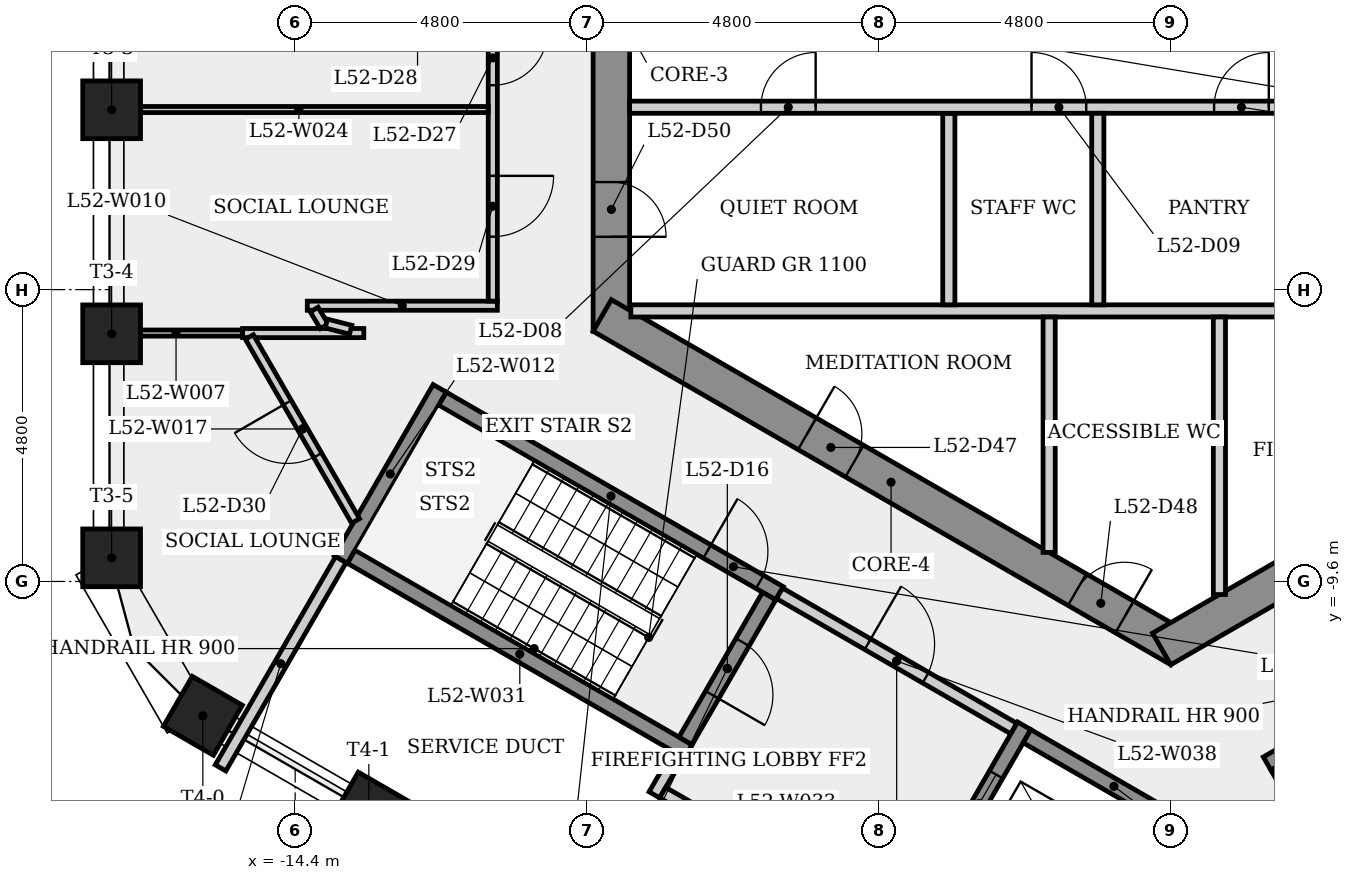
"""IFC4 building model, lengths in metres.
Left out: names, types, materials, properties, quantities, classifications, styles, units other than length and angle.
Written with IfcOpenShell. Run it as: python <this file> out.ifc"""

import sys

from ifc_helpers import new_model, si_unit, direction, frame, frame_2d, origin, origin_2d, place, context, subcontext, project, spatial, rectangle, extrude, element, fill, save


model = new_model("IFC4")
c1 = context("Model", 3, precision=1e-05, world=origin(), true_north=direction((0.0, 1.0)))
c2 = subcontext(c1, "Body", "Model", "MODEL_VIEW")
j1 = project(units=[si_unit("LENGTHUNIT", "METRE"), si_unit("PLANEANGLEUNIT", "RADIAN")], contexts=[c1])
p1 = place(None, origin())
s1 = spatial("IfcSite", under=j1, at=p1, CompositionType="ELEMENT")
p2 = place(p1, origin())
s2 = spatial("IfcBuilding", under=s1, at=p2, CompositionType="ELEMENT")
p3 = place(p2, frame((0.0, 0.0, 194.7)))
s3 = spatial("IfcBuildingStorey", under=s2, at=p3, CompositionType="ELEMENT", Elevation=194.7)
p4 = place(p3, frame((-9.2, 5.485, 0.0), z_axis=(0.0, 0.0, 1.0), x_axis=(0.0, -1.0, 0.0)))
e1 = element("IfcWall", 1, at=p4, inside=s3, PredefinedType="SHEAR", context=c2, shape_type="SweptSolid", body=[
    extrude(rectangle(XDim=10.97, YDim=0.6, at=frame_2d((5.485, 0.0))), origin(), (0.0, 0.0, 1.0), 4.0),
])
p5 = place(p4, frame((8.516, 0.0, 0.0)))
e2 = element("IfcOpeningElement", 2, at=p5, cuts=e1, PredefinedType="OPENING", context=c2, shape_type="SweptSolid", body=[
    extrude(rectangle(XDim=0.9, YDim=2.1, at=frame_2d((0.45, 1.05))), frame((0.0, 0.31, 0.0), z_axis=(0.0, -1.0, 0.0), x_axis=(1.0, 0.0, 0.0)), (0.0, 0.0, 1.0), 0.62),
])
p6 = place(p4, frame((4.685, 0.0, 0.0)))
e3 = element("IfcOpeningElement", 3, at=p6, cuts=e1, PredefinedType="OPENING", context=c2, shape_type="SweptSolid", body=[
    extrude(rectangle(XDim=1.6, YDim=2.1, at=frame_2d((0.8, 1.05))), frame((0.0, 0.31, 0.0), z_axis=(0.0, -1.0, 0.0), x_axis=(1.0, 0.0, 0.0)), (0.0, 0.0, 1.0), 0.62),
])
p7 = place(p3, frame((-9.35, -5.225, 0.0), z_axis=(0.0, 0.0, 1.0), x_axis=(0.866023993627, -0.500002442456, 0.0)))
e4 = element("IfcWall", 4, at=p7, inside=s3, PredefinedType="SHEAR", context=c2, shape_type="SweptSolid", body=[
    extrude(rectangle(XDim=10.97, YDim=0.6, at=frame_2d((5.485, 0.0))), origin(), (0.0, 0.0, 1.0), 4.0),
])
p8 = place(p7, frame((3.891, 0.0, 0.0)))
e5 = element("IfcOpeningElement", 5, at=p8, cuts=e4, PredefinedType="OPENING", context=c2, shape_type="SweptSolid", body=[
    extrude(rectangle(XDim=0.9, YDim=2.1, at=frame_2d((0.45, 1.05))), frame((0.0, 0.31, 0.0), z_axis=(0.0, -1.0, 0.0), x_axis=(1.0, 0.0, 0.0)), (0.0, 0.0, 1.0), 0.62),
])
p9 = place(p7, frame((9.018, 0.0, 0.0)))
e6 = element("IfcOpeningElement", 6, at=p9, cuts=e4, PredefinedType="OPENING", context=c2, shape_type="SweptSolid", body=[
    extrude(rectangle(XDim=0.9, YDim=2.1, at=frame_2d((0.45, 1.05))), frame((0.0, 0.31, 0.0), z_axis=(0.0, -1.0, 0.0), x_axis=(1.0, 0.0, 0.0)), (0.0, 0.0, 1.0), 0.62),
])
p10 = place(p3, frame((-0.15, -10.71, 0.0), z_axis=(0.0, 0.0, 1.0), x_axis=(0.866023993627, 0.500002442456, 0.0)))
e7 = element("IfcWall", 7, at=p10, inside=s3, PredefinedType="SHEAR", context=c2, shape_type="SweptSolid", body=[
    extrude(rectangle(XDim=10.97, YDim=0.6, at=frame_2d((5.485, 0.0))), origin(), (0.0, 0.0, 1.0), 4.0),
])
p11 = place(p10, frame((7.166, 0.0, 0.0)))
e8 = element("IfcOpeningElement", 8, at=p11, cuts=e7, PredefinedType="OPENING", context=c2, shape_type="SweptSolid", body=[
    extrude(rectangle(XDim=0.9, YDim=2.1, at=frame_2d((0.45, 1.05))), frame((0.0, 0.31, 0.0), z_axis=(0.0, -1.0, 0.0), x_axis=(1.0, 0.0, 0.0)), (0.0, 0.0, 1.0), 0.62),
])
for number, where, z_axis, x_axis in (
    (9, (-17.418, -1.842, 0.0), (0.0, 0.0, 1.0), (-1.0, 0.0, 0.0)),
    (10, (-17.418, -5.527, 0.0), (0.0, 0.0, 1.0), (-1.0, 0.0, 0.0)),
    (11, (-17.418, -9.211, 0.0), (0.0, 0.0, 1.0), (-1.0, 0.0, 0.0)),
    (12, (-15.918, -11.809, 0.0), (0.0, 0.0, 1.0), (-0.5, -0.866, 0.0)),
    (13, (-13.188, -13.386, 0.0), (0.0, 0.0, 1.0), (-0.5, -0.866, 0.0)),
):
    element("IfcColumn", number, at=place(p3, frame(where, z_axis=z_axis, x_axis=x_axis)), inside=s3, PredefinedType="COLUMN", context=c2, shape_type="SweptSolid", body=[
        extrude(rectangle(XDim=0.95, YDim=0.95, at=origin_2d()), origin(), (0.0, 0.0, 1.0), 4.0),
    ])
p12 = place(p3, frame((-15.627, -12.666, 0.0), z_axis=(0.0, 0.0, 1.0), x_axis=(0.499980548326, 0.866036633923, 0.0)))
e14 = element("IfcWall", 14, at=p12, inside=s3, PredefinedType="PLUMBINGWALL", context=c2, shape_type="SweptSolid", body=[
    extrude(rectangle(XDim=3.958, YDim=0.2, at=frame_2d((1.979, 0.0))), origin(), (0.0, 0.0, 1.0), 3.65),
])
p13 = place(p3, frame((-15.265, -5.515, 0.0), z_axis=(0.0, 0.0, 1.0), x_axis=(1.0, 0.0, 0.0)))
e15 = element("IfcWall", 15, at=p13, inside=s3, PredefinedType="PARTITIONING", context=c2, shape_type="SweptSolid", body=[
    extrude(rectangle(XDim=1.994, YDim=0.15, at=frame_2d((0.997, 0.0))), origin(), (0.0, 0.0, 1.0), 3.65),
])
p14 = place(p3, frame((-15.265, -5.515, 0.0), z_axis=(0.0, 0.0, 1.0), x_axis=(-1.0, 0.0, 0.0)))
e16 = element("IfcWall", 16, at=p14, inside=s3, PredefinedType="PARTITIONING", context=c2, shape_type="SweptSolid", body=[
    extrude(rectangle(XDim=2.188, YDim=0.1, at=frame_2d((1.094, 0.0))), origin(), (0.0, 0.0, 1.0), 3.65),
])
p15 = place(p3, frame((-14.201, -5.065, 0.0), z_axis=(0.0, 0.0, 1.0), x_axis=(1.0, 0.0, 0.0)))
e17 = element("IfcWall", 17, at=p15, inside=s3, PredefinedType="PARTITIONING", context=c2, shape_type="SweptSolid", body=[
    extrude(rectangle(XDim=3.126, YDim=0.15, at=frame_2d((1.563, 0.0))), origin(), (0.0, 0.0, 1.0), 3.65),
])
p16 = place(p3, frame((-13.922, -5.404, 0.0), z_axis=(0.0, 0.0, 1.0), x_axis=(-0.516174148431, 0.856483653371, 0.0)))
e18 = element("IfcWall", 18, at=p16, inside=s3, PredefinedType="PARTITIONING", context=c2, shape_type="SweptSolid", body=[
    extrude(rectangle(XDim=0.321, YDim=0.15, at=frame_2d((0.16, 0.0))), origin(), (0.0, 0.0, 1.0), 3.65),
])
p17 = place(p3, frame((-13.648, -9.239, 0.0), z_axis=(0.0, 0.0, 1.0), x_axis=(0.500017246033, 0.866015446554, 0.0)))
e19 = element("IfcWall", 19, at=p17, inside=s3, PredefinedType="SHEAR", context=c2, shape_type="SweptSolid", body=[
    extrude(rectangle(XDim=3.25, YDim=0.25, at=frame_2d((1.625, 0.0))), origin(), (0.0, 0.0, 1.0), 3.65),
])
p18 = place(p3, frame((-13.487, -5.46, 0.0), z_axis=(0.0, 0.0, 1.0), x_axis=(-0.968736704431, 0.248091107232, 0.0)))
e20 = element("IfcWall", 20, at=p18, inside=s3, PredefinedType="PARTITIONING", context=c2, shape_type="SweptSolid", body=[
    extrude(rectangle(XDim=0.413, YDim=0.15, at=frame_2d((0.207, 0.0))), origin(), (0.0, 0.0, 1.0), 3.65),
])
p19 = place(p3, frame((-13.406, -8.604, 0.0), z_axis=(0.0, 0.0, 1.0), x_axis=(-0.499980611808, 0.866036597273, 0.0)))
e21 = element("IfcWall", 21, at=p19, inside=s3, PredefinedType="PARTITIONING", context=c2, shape_type="SweptSolid", body=[
    extrude(rectangle(XDim=3.493, YDim=0.15, at=frame_2d((1.747, 0.0))), origin(), (0.0, 0.0, 1.0), 3.65),
])
p20 = place(p19, frame((1.246, 0.0, 0.0)))
e22 = element("IfcOpeningElement", 22, at=p20, cuts=e21, PredefinedType="OPENING", context=c2, shape_type="SweptSolid", body=[
    extrude(rectangle(XDim=1.0, YDim=2.1, at=frame_2d((0.5, 1.05))), frame((0.0, 0.085, 0.0), z_axis=(0.0, -1.0, 0.0), x_axis=(1.0, 0.0, 0.0)), (0.0, 0.0, 1.0), 0.17),
])
p21 = place(p3, frame((-11.977, -6.595, 0.0), z_axis=(0.0, 0.0, 1.0), x_axis=(0.866025499775, -0.499999833739, 0.0)))
e23 = element("IfcWall", 23, at=p21, inside=s3, PredefinedType="SHEAR", context=c2, shape_type="SweptSolid", body=[
    extrude(rectangle(XDim=6.4, YDim=0.25, at=frame_2d((3.2, 0.0))), origin(), (0.0, 0.0, 1.0), 3.65),
])
p22 = place(p21, frame((5.025, 0.0, 0.0)))
e24 = element("IfcOpeningElement", 24, at=p22, cuts=e23, PredefinedType="OPENING", context=c2, shape_type="SweptSolid", body=[
    extrude(rectangle(XDim=1.0, YDim=2.1, at=frame_2d((0.5, 1.05))), frame((0.0, 0.135, 0.0), z_axis=(0.0, -1.0, 0.0), x_axis=(1.0, 0.0, 0.0)), (0.0, 0.0, 1.0), 0.27),
])
p23 = place(p3, frame((-11.15, 5.59, 0.0), z_axis=(0.0, 0.0, 1.0), x_axis=(0.0, -1.0, 0.0)))
e25 = element("IfcWall", 25, at=p23, inside=s3, PredefinedType="PARTITIONING", context=c2, shape_type="SweptSolid", body=[
    extrude(rectangle(XDim=10.579, YDim=0.15, at=frame_2d((5.29, 0.0))), origin(), (0.0, 0.0, 1.0), 3.65),
])
p24 = place(p23, frame((6.128, 0.0, 0.0)))
e26 = element("IfcOpeningElement", 26, at=p24, cuts=e25, PredefinedType="OPENING", context=c2, shape_type="SweptSolid", body=[
    extrude(rectangle(XDim=0.9, YDim=2.1, at=frame_2d((0.45, 1.05))), frame((0.0, 0.085, 0.0), z_axis=(0.0, -1.0, 0.0), x_axis=(1.0, 0.0, 0.0)), (0.0, 0.0, 1.0), 0.17),
])
p25 = place(p23, frame((8.519, 0.0, 0.0)))
e27 = element("IfcOpeningElement", 27, at=p25, cuts=e25, PredefinedType="OPENING", context=c2, shape_type="SweptSolid", body=[
    extrude(rectangle(XDim=1.0, YDim=2.1, at=frame_2d((0.5, 1.05))), frame((0.0, 0.085, 0.0), z_axis=(0.0, -1.0, 0.0), x_axis=(1.0, 0.0, 0.0)), (0.0, 0.0, 1.0), 0.17),
])
p26 = place(p3, frame((-11.225, -1.838, 0.0), z_axis=(0.0, 0.0, 1.0), x_axis=(-1.0, 0.0, 0.0)))
e28 = element("IfcWall", 28, at=p26, inside=s3, PredefinedType="PARTITIONING", context=c2, shape_type="SweptSolid", body=[
    extrude(rectangle(XDim=6.228, YDim=0.1, at=frame_2d((3.114, 0.0))), origin(), (0.0, 0.0, 1.0), 3.65),
])
p27 = place(p3, frame((-8.88, -5.15, 0.0), z_axis=(0.0, 0.0, 1.0), x_axis=(1.0, 0.0, 0.0)))
e29 = element("IfcWall", 29, at=p27, inside=s3, PredefinedType="PARTITIONING", context=c2, shape_type="SweptSolid", body=[
    extrude(rectangle(XDim=11.205, YDim=0.2, at=frame_2d((5.603, 0.0))), origin(), (0.0, 0.0, 1.0), 3.65),
])
p28 = place(p3, frame((-8.493, -13.11, 0.0), z_axis=(0.0, 0.0, 1.0), x_axis=(0.500067724834, 0.865986299303, 0.0)))
e30 = element("IfcWall", 30, at=p28, inside=s3, PredefinedType="PLUMBINGWALL", context=c2, shape_type="SweptSolid", body=[
    extrude(rectangle(XDim=0.775, YDim=0.2, at=frame_2d((0.388, 0.0))), origin(), (0.0, 0.0, 1.0), 3.65),
])
p29 = place(p3, frame((-7.935, -12.393, 0.0), z_axis=(0.0, 0.0, 1.0), x_axis=(-0.866025499775, 0.499999833739, 0.0)))
e31 = element("IfcWall", 31, at=p29, inside=s3, PredefinedType="SHEAR", context=c2, shape_type="SweptSolid", body=[
    extrude(rectangle(XDim=6.4, YDim=0.25, at=frame_2d((3.2, 0.0))), origin(), (0.0, 0.0, 1.0), 3.65),
])
p30 = place(p3, frame((-8.356, -13.073, 0.0), z_axis=(0.0, 0.0, 1.0), x_axis=(0.866038532462, -0.499977259774, 0.0)))
e32 = element("IfcWall", 32, at=p30, inside=s3, PredefinedType="PLUMBINGWALL", context=c2, shape_type="SweptSolid", body=[
    extrude(rectangle(XDim=4.7, YDim=0.2, at=frame_2d((2.35, 0.0))), origin(), (0.0, 0.0, 1.0), 3.65),
])
p31 = place(p3, frame((-6.605, -9.841, 0.0), z_axis=(0.0, 0.0, 1.0), x_axis=(-0.499996545922, -0.866027397988, 0.0)))
e33 = element("IfcWall", 33, at=p31, inside=s3, PredefinedType="SHEAR", context=c2, shape_type="SweptSolid", body=[
    extrude(rectangle(XDim=2.75, YDim=0.25, at=frame_2d((1.375, 0.0))), origin(), (0.0, 0.0, 1.0), 3.65),
])
p32 = place(p31, frame((0.875, 0.0, 0.0)))
e34 = element("IfcOpeningElement", 34, at=p32, cuts=e33, PredefinedType="OPENING", context=c2, shape_type="SweptSolid", body=[
    extrude(rectangle(XDim=1.0, YDim=2.1, at=frame_2d((0.5, 1.05))), frame((0.0, 0.135, 0.0), z_axis=(0.0, -1.0, 0.0), x_axis=(1.0, 0.0, 0.0)), (0.0, 0.0, 1.0), 0.27),
])
p33 = place(p3, frame((-6.435, -9.795, 0.0), z_axis=(0.0, 0.0, 1.0), x_axis=(0.866012907634, -0.500021643343, 0.0)))
e35 = element("IfcWall", 35, at=p33, inside=s3, PredefinedType="PARTITIONING", context=c2, shape_type="SweptSolid", body=[
    extrude(rectangle(XDim=4.45, YDim=0.2, at=frame_2d((2.225, 0.0))), origin(), (0.0, 0.0, 1.0), 3.65),
])
p34 = place(p33, frame((1.675, 0.0, 0.0)))
e36 = element("IfcOpeningElement", 36, at=p34, cuts=e35, PredefinedType="OPENING", context=c2, shape_type="SweptSolid", body=[
    extrude(rectangle(XDim=1.1, YDim=2.1, at=frame_2d((0.55, 1.05))), frame((0.0, 0.11, 0.0), z_axis=(0.0, -1.0, 0.0), x_axis=(1.0, 0.0, 0.0)), (0.0, 0.0, 1.0), 0.22),
])
p35 = place(p3, frame((-3.65, -1.9, 0.0), z_axis=(0.0, 0.0, 1.0), x_axis=(0.0, -1.0, 0.0)))
e37 = element("IfcWall", 37, at=p35, inside=s3, PredefinedType="PARTITIONING", context=c2, shape_type="SweptSolid", body=[
    extrude(rectangle(XDim=3.15, YDim=0.2, at=frame_2d((1.575, 0.0))), origin(), (0.0, 0.0, 1.0), 3.65),
])
p36 = place(p3, frame((-8.9, -1.8, 0.0), z_axis=(0.0, 0.0, 1.0), x_axis=(1.0, 0.0, 0.0)))
e38 = element("IfcWall", 38, at=p36, inside=s3, PredefinedType="PARTITIONING", context=c2, shape_type="SweptSolid", body=[
    extrude(rectangle(XDim=11.225, YDim=0.2, at=frame_2d((5.613, 0.0))), origin(), (0.0, 0.0, 1.0), 3.65),
])
p37 = place(p36, frame((2.16, 0.0, 0.0)))
e39 = element("IfcOpeningElement", 39, at=p37, cuts=e38, PredefinedType="OPENING", context=c2, shape_type="SweptSolid", body=[
    extrude(rectangle(XDim=0.9, YDim=2.1, at=frame_2d((0.45, 1.05))), frame((0.0, 0.11, 0.0), z_axis=(0.0, -1.0, 0.0), x_axis=(1.0, 0.0, 0.0)), (0.0, 0.0, 1.0), 0.22),
])
p38 = place(p36, frame((6.61, 0.0, 0.0)))
e40 = element("IfcOpeningElement", 40, at=p38, cuts=e38, PredefinedType="OPENING", context=c2, shape_type="SweptSolid", body=[
    extrude(rectangle(XDim=0.9, YDim=2.1, at=frame_2d((0.45, 1.05))), frame((0.0, 0.11, 0.0), z_axis=(0.0, -1.0, 0.0), x_axis=(1.0, 0.0, 0.0)), (0.0, 0.0, 1.0), 0.22),
])
p39 = place(p36, frame((9.613, 0.0, 0.0)))
e41 = element("IfcOpeningElement", 41, at=p39, cuts=e38, PredefinedType="OPENING", context=c2, shape_type="SweptSolid", body=[
    extrude(rectangle(XDim=0.9, YDim=2.1, at=frame_2d((0.45, 1.05))), frame((0.0, 0.11, 0.0), z_axis=(0.0, -1.0, 0.0), x_axis=(1.0, 0.0, 0.0)), (0.0, 0.0, 1.0), 0.22),
])
p40 = place(p3, frame((-2.41, -11.974, 0.0), z_axis=(0.0, 0.0, 1.0), x_axis=(-0.500001826776, -0.866024349092, 0.0)))
e42 = element("IfcWall", 42, at=p40, inside=s3, PredefinedType="SHEAR", context=c2, shape_type="SweptSolid", body=[
    extrude(rectangle(XDim=2.95, YDim=0.25, at=frame_2d((1.475, 0.0))), origin(), (0.0, 0.0, 1.0), 3.65),
])
p41 = place(p40, frame((0.925, 0.0, 0.0)))
e43 = element("IfcOpeningElement", 43, at=p41, cuts=e42, PredefinedType="OPENING", context=c2, shape_type="SweptSolid", body=[
    extrude(rectangle(XDim=1.1, YDim=2.1, at=frame_2d((0.55, 1.05))), frame((0.0, 0.135, 0.0), z_axis=(0.0, -1.0, 0.0), x_axis=(1.0, 0.0, 0.0)), (0.0, 0.0, 1.0), 0.27),
])
p42 = place(p3, frame((-2.364, -12.145, 0.0), z_axis=(0.0, 0.0, 1.0), x_axis=(0.866040211805, -0.499974350878, 0.0)))
e44 = element("IfcWall", 44, at=p42, inside=s3, PredefinedType="SHEAR", context=c2, shape_type="SweptSolid", body=[
    extrude(rectangle(XDim=3.3, YDim=0.25, at=frame_2d((1.65, 0.0))), origin(), (0.0, 0.0, 1.0), 3.65),
])
p43 = place(p3, frame((-2.0, -5.25, 0.0), z_axis=(0.0, 0.0, 1.0), x_axis=(0.0, -1.0, 0.0)))
e45 = element("IfcWall", 45, at=p43, inside=s3, PredefinedType="PARTITIONING", context=c2, shape_type="SweptSolid", body=[
    extrude(rectangle(XDim=3.872, YDim=0.2, at=frame_2d((1.936, 0.0))), origin(), (0.0, 0.0, 1.0), 3.65),
])
p44 = place(p3, frame((-1.2, -1.9, 0.0), z_axis=(0.0, 0.0, 1.0), x_axis=(0.0, -1.0, 0.0)))
e46 = element("IfcWall", 46, at=p44, inside=s3, PredefinedType="PARTITIONING", context=c2, shape_type="SweptSolid", body=[
    extrude(rectangle(XDim=3.15, YDim=0.2, at=frame_2d((1.575, 0.0))), origin(), (0.0, 0.0, 1.0), 3.65),
])
p45 = place(p3, frame((0.8, -5.25, 0.0), z_axis=(0.0, 0.0, 1.0), x_axis=(0.0, -1.0, 0.0)))
e47 = element("IfcWall", 47, at=p45, inside=s3, PredefinedType="PARTITIONING", context=c2, shape_type="SweptSolid", body=[
    extrude(rectangle(XDim=4.565, YDim=0.2, at=frame_2d((2.282, 0.0))), origin(), (0.0, 0.0, 1.0), 3.65),
])
p46 = place(p3, frame((1.585, -12.595, 0.0), z_axis=(0.0, 0.0, 1.0), x_axis=(0.866036417653, 0.499980922934, 0.0)))
e48 = element("IfcWall", 48, at=p46, inside=s3, PredefinedType="SHEAR", context=c2, shape_type="SweptSolid", body=[
    extrude(rectangle(XDim=6.65, YDim=0.25, at=frame_2d((3.325, 0.0))), origin(), (0.0, 0.0, 1.0), 3.65),
])
p47 = place(p46, frame((5.275, 0.0, 0.0)))
e49 = element("IfcOpeningElement", 49, at=p47, cuts=e48, PredefinedType="OPENING", context=c2, shape_type="SweptSolid", body=[
    extrude(rectangle(XDim=1.0, YDim=2.1, at=frame_2d((0.5, 1.05))), frame((0.0, 0.135, 0.0), z_axis=(0.0, -1.0, 0.0), x_axis=(1.0, 0.0, 0.0)), (0.0, 0.0, 1.0), 0.27),
])
p48 = place(p3, frame((3.256, -15.239, 0.0), z_axis=(0.0, 0.0, 1.0), x_axis=(-0.50002537861, 0.866010750942, 0.0)))
e50 = element("IfcWall", 50, at=p48, inside=s3, PredefinedType="SHEAR", context=c2, shape_type="SweptSolid", body=[
    extrude(rectangle(XDim=3.0, YDim=0.25, at=frame_2d((1.5, 0.0))), origin(), (0.0, 0.0, 1.0), 3.65),
])
p49 = place(p37, origin())
e51 = element("IfcDoor", 51, at=p49, inside=s3, OperationType="SINGLE_SWING_RIGHT", PredefinedType="DOOR", context=c2, shape_type="SweptSolid", body=[
    extrude(rectangle(XDim=0.9, YDim=2.1, at=frame_2d((0.45, 1.05))), frame((0.0, 0.025, 0.0), z_axis=(0.0, -1.0, 0.0), x_axis=(1.0, 0.0, 0.0)), (0.0, 0.0, 1.0), 0.05),
])
fill(e39, e51)
p50 = place(p38, origin())
e52 = element("IfcDoor", 52, at=p50, inside=s3, OperationType="SINGLE_SWING_LEFT", PredefinedType="DOOR", context=c2, shape_type="SweptSolid", body=[
    extrude(rectangle(XDim=0.9, YDim=2.1, at=frame_2d((0.45, 1.05))), frame((0.0, 0.025, 0.0), z_axis=(0.0, -1.0, 0.0), x_axis=(1.0, 0.0, 0.0)), (0.0, 0.0, 1.0), 0.05),
])
fill(e40, e52)
p51 = place(p39, origin())
e53 = element("IfcDoor", 53, at=p51, inside=s3, OperationType="SINGLE_SWING_RIGHT", PredefinedType="DOOR", context=c2, shape_type="SweptSolid", body=[
    extrude(rectangle(XDim=0.9, YDim=2.1, at=frame_2d((0.45, 1.05))), frame((0.0, 0.025, 0.0), z_axis=(0.0, -1.0, 0.0), x_axis=(1.0, 0.0, 0.0)), (0.0, 0.0, 1.0), 0.05),
])
fill(e41, e53)
p52 = place(p22, origin())
e54 = element("IfcDoor", 54, at=p52, inside=s3, OperationType="SINGLE_SWING_LEFT", PredefinedType="DOOR", context=c2, shape_type="SweptSolid", body=[
    extrude(rectangle(XDim=1.0, YDim=2.1, at=frame_2d((0.5, 1.05))), frame((0.0, 0.025, 0.0), z_axis=(0.0, -1.0, 0.0), x_axis=(1.0, 0.0, 0.0)), (0.0, 0.0, 1.0), 0.05),
])
fill(e24, e54)
p53 = place(p32, origin())
e55 = element("IfcDoor", 55, at=p53, inside=s3, OperationType="SINGLE_SWING_RIGHT", PredefinedType="DOOR", context=c2, shape_type="SweptSolid", body=[
    extrude(rectangle(XDim=1.0, YDim=2.1, at=frame_2d((0.5, 1.05))), frame((0.0, 0.025, 0.0), z_axis=(0.0, -1.0, 0.0), x_axis=(1.0, 0.0, 0.0)), (0.0, 0.0, 1.0), 0.05),
])
fill(e34, e55)
p54 = place(p34, origin())
e56 = element("IfcDoor", 56, at=p54, inside=s3, OperationType="SINGLE_SWING_LEFT", PredefinedType="DOOR", context=c2, shape_type="SweptSolid", body=[
    extrude(rectangle(XDim=1.1, YDim=2.1, at=frame_2d((0.55, 1.05))), frame((0.0, 0.025, 0.0), z_axis=(0.0, -1.0, 0.0), x_axis=(1.0, 0.0, 0.0)), (0.0, 0.0, 1.0), 0.05),
])
fill(e36, e56)
p55 = place(p41, origin())
e57 = element("IfcDoor", 57, at=p55, inside=s3, OperationType="SLIDING_TO_LEFT", PredefinedType="DOOR", context=c2, shape_type="SweptSolid", body=[
    extrude(rectangle(XDim=1.1, YDim=2.1, at=frame_2d((0.55, 1.05))), frame((0.0, 0.025, 0.0), z_axis=(0.0, -1.0, 0.0), x_axis=(1.0, 0.0, 0.0)), (0.0, 0.0, 1.0), 0.05),
])
fill(e43, e57)
p56 = place(p24, origin())
e58 = element("IfcDoor", 58, at=p56, inside=s3, OperationType="SINGLE_SWING_LEFT", PredefinedType="DOOR", context=c2, shape_type="SweptSolid", body=[
    extrude(rectangle(XDim=0.9, YDim=2.1, at=frame_2d((0.45, 1.05))), frame((0.0, 0.025, 0.0), z_axis=(0.0, -1.0, 0.0), x_axis=(1.0, 0.0, 0.0)), (0.0, 0.0, 1.0), 0.05),
])
fill(e26, e58)
p57 = place(p25, origin())
e59 = element("IfcDoor", 59, at=p57, inside=s3, OperationType="SINGLE_SWING_LEFT", PredefinedType="DOOR", context=c2, shape_type="SweptSolid", body=[
    extrude(rectangle(XDim=1.0, YDim=2.1, at=frame_2d((0.5, 1.05))), frame((0.0, 0.025, 0.0), z_axis=(0.0, -1.0, 0.0), x_axis=(1.0, 0.0, 0.0)), (0.0, 0.0, 1.0), 0.05),
])
fill(e27, e59)
p58 = place(p20, origin())
e60 = element("IfcDoor", 60, at=p58, inside=s3, OperationType="SINGLE_SWING_RIGHT", PredefinedType="DOOR", context=c2, shape_type="SweptSolid", body=[
    extrude(rectangle(XDim=1.0, YDim=2.1, at=frame_2d((0.5, 1.05))), frame((0.0, 0.025, 0.0), z_axis=(0.0, -1.0, 0.0), x_axis=(1.0, 0.0, 0.0)), (0.0, 0.0, 1.0), 0.05),
])
fill(e22, e60)
p59 = place(p8, origin())
e61 = element("IfcDoor", 61, at=p59, inside=s3, OperationType="SINGLE_SWING_LEFT", PredefinedType="DOOR", context=c2, shape_type="SweptSolid", body=[
    extrude(rectangle(XDim=0.9, YDim=2.1, at=frame_2d((0.45, 1.05))), frame((0.0, 0.025, 0.0), z_axis=(0.0, -1.0, 0.0), x_axis=(1.0, 0.0, 0.0)), (0.0, 0.0, 1.0), 0.05),
])
fill(e5, e61)
p60 = place(p9, origin())
e62 = element("IfcDoor", 62, at=p60, inside=s3, OperationType="SINGLE_SWING_RIGHT", PredefinedType="DOOR", context=c2, shape_type="SweptSolid", body=[
    extrude(rectangle(XDim=0.9, YDim=2.1, at=frame_2d((0.45, 1.05))), frame((0.0, 0.025, 0.0), z_axis=(0.0, -1.0, 0.0), x_axis=(1.0, 0.0, 0.0)), (0.0, 0.0, 1.0), 0.05),
])
fill(e6, e62)
p61 = place(p5, origin())
e63 = element("IfcDoor", 63, at=p61, inside=s3, OperationType="SINGLE_SWING_RIGHT", PredefinedType="DOOR", context=c2, shape_type="SweptSolid", body=[
    extrude(rectangle(XDim=0.9, YDim=2.1, at=frame_2d((0.45, 1.05))), frame((0.0, 0.025, 0.0), z_axis=(0.0, -1.0, 0.0), x_axis=(1.0, 0.0, 0.0)), (0.0, 0.0, 1.0), 0.05),
])
fill(e2, e63)
save(model, sys.argv[1])
